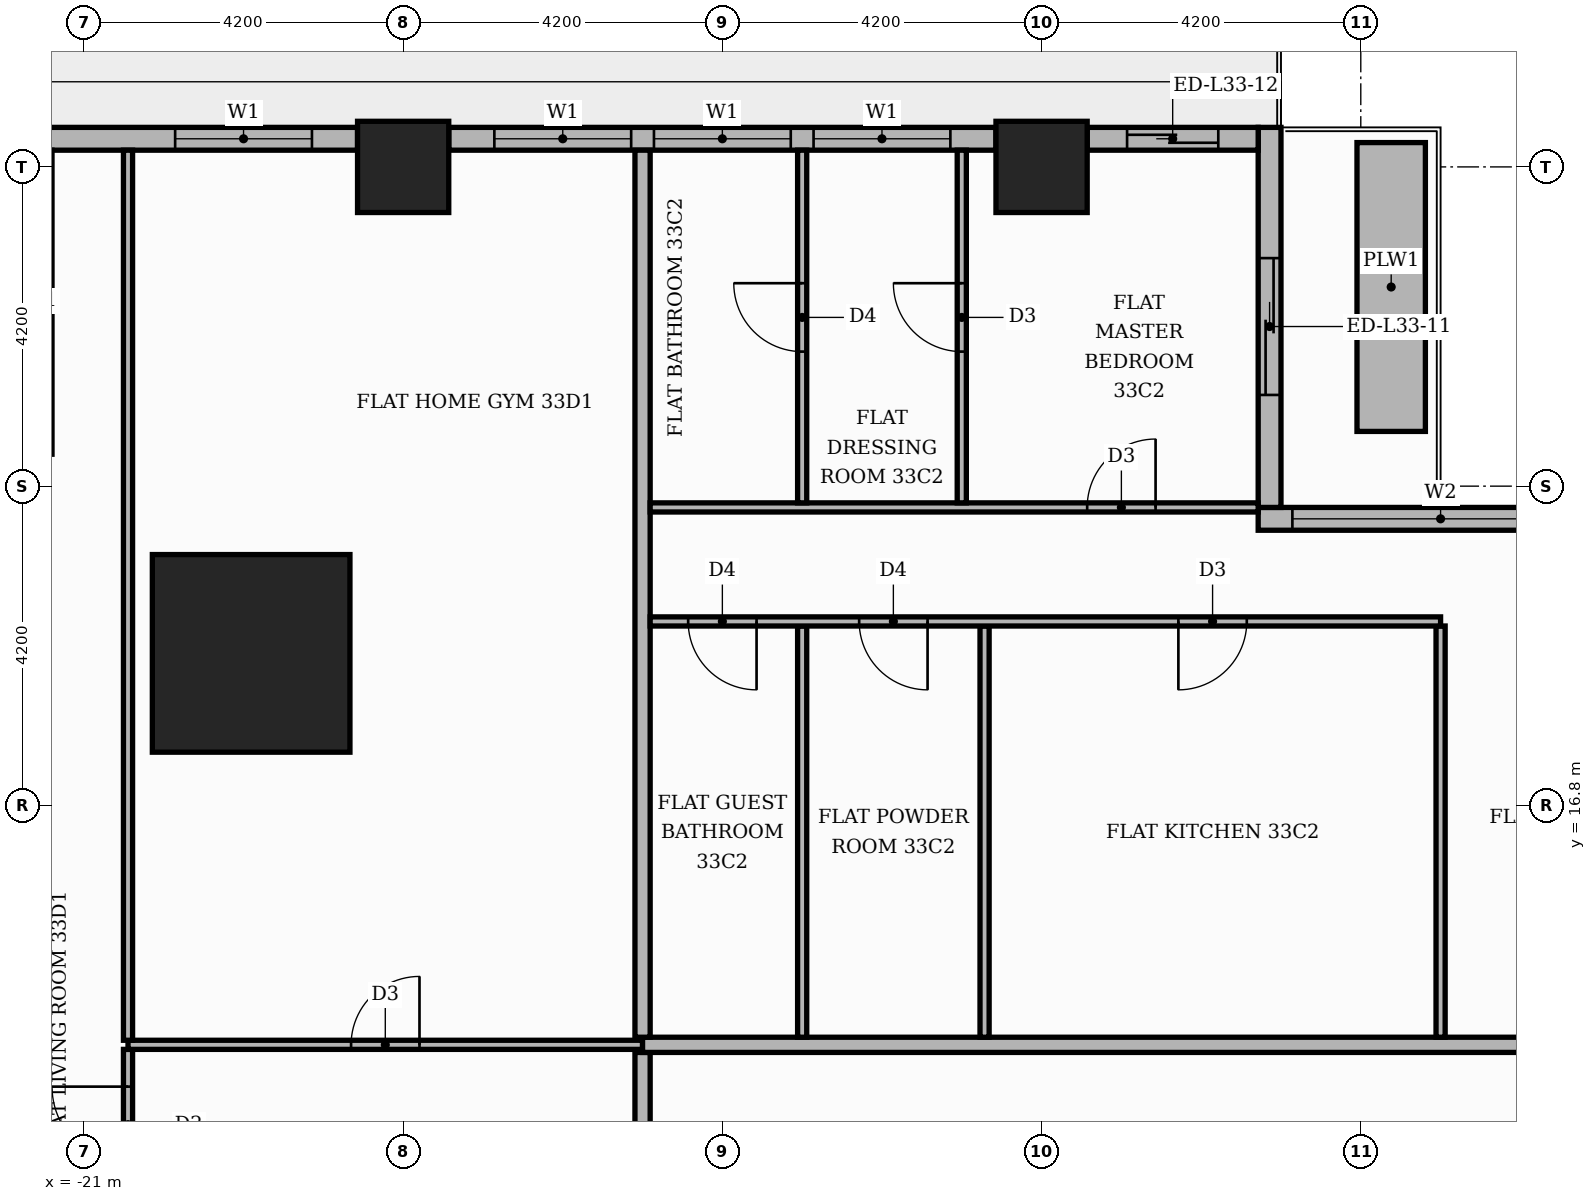
"""IFC4 building model, lengths in metres.
Left out: names, types, materials, properties, quantities, classifications, styles, units other than length and angle.
Written with IfcOpenShell. Run it as: python <this file> out.ifc"""

import sys

from ifc_helpers import new_model, si_unit, direction, frame, frame_2d, origin, origin_2d, place, context, subcontext, project, spatial, rectangle, extrude, element, fill, save


model = new_model("IFC4")
c1 = context("Model", 3, precision=1e-05, world=origin(), true_north=direction((0.0, 1.0)))
c2 = subcontext(c1, "Body", "Model", "MODEL_VIEW")
j1 = project(units=[si_unit("LENGTHUNIT", "METRE"), si_unit("PLANEANGLEUNIT", "RADIAN")], contexts=[c1])
p1 = place(None, origin())
s1 = spatial("IfcSite", under=j1, at=p1, CompositionType="ELEMENT")
p2 = place(p1, origin())
s2 = spatial("IfcBuilding", under=s1, at=p2, CompositionType="ELEMENT")
p3 = place(p2, frame((0.0, 0.0, 141.6)))
s3 = spatial("IfcBuildingStorey", under=s2, at=p3, CompositionType="ELEMENT", Elevation=141.6)
p4 = place(p3, frame((-18.8, 18.8, 0.0), z_axis=(0.0, 0.0, 1.0), x_axis=(1.0, 0.0, 0.0)))
e1 = element("IfcColumn", 1, at=p4, inside=s3, PredefinedType="COLUMN", context=c2, shape_type="SweptSolid", body=[
    extrude(rectangle(XDim=2.6, YDim=2.6, at=origin_2d()), origin(), (0.0, 0.0, 1.0), 3.9),
])
for number, where, z_axis, x_axis in (
    (2, (-8.4, 25.2, 0.0), (0.0, 0.0, 1.0), (1.0, 0.0, 0.0)),
    (3, (-16.8, 25.2, 0.0), (0.0, 0.0, 1.0), (1.0, 0.0, 0.0)),
):
    element("IfcColumn", number, at=place(p3, frame(where, z_axis=z_axis, x_axis=x_axis)), inside=s3, PredefinedType="COLUMN", context=c2, shape_type="SweptSolid", body=[
        extrude(rectangle(XDim=1.2, YDim=1.2, at=origin_2d()), origin(), (0.0, 0.0, 1.0), 3.9),
    ])
p5 = place(p3, frame((5.25, 20.57, 0.0), z_axis=(0.0, 0.0, 1.0), x_axis=(-1.0, 0.0, 0.0)))
e4 = element("IfcWall", 4, at=p5, inside=s3, PredefinedType="STANDARD", context=c2, shape_type="SweptSolid", body=[
    extrude(rectangle(XDim=10.8, YDim=0.3, at=frame_2d((5.4, 0.0))), origin(), (0.0, 0.0, 1.0), 3.48),
])
p6 = place(p5, frame((0.15, 0.0, 0.9)))
e5 = element("IfcOpeningElement", 5, at=p6, cuts=e4, PredefinedType="OPENING", context=c2, shape_type="SweptSolid", body=[
    extrude(rectangle(XDim=6.0, YDim=2.1, at=frame_2d((3.0, 1.05))), frame((0.0, 0.16, 0.0), z_axis=(0.0, -1.0, 0.0), x_axis=(1.0, 0.0, 0.0)), (0.0, 0.0, 1.0), 0.32),
])
p7 = place(p5, frame((6.45, 0.0, 0.9)))
e6 = element("IfcOpeningElement", 6, at=p7, cuts=e4, PredefinedType="OPENING", context=c2, shape_type="SweptSolid", body=[
    extrude(rectangle(XDim=3.9, YDim=2.1, at=frame_2d((1.95, 1.05))), frame((0.0, 0.16, 0.0), z_axis=(0.0, -1.0, 0.0), x_axis=(1.0, 0.0, 0.0)), (0.0, 0.0, 1.0), 0.32),
])
p8 = place(p3, frame((-5.4, 20.72, 0.0), z_axis=(0.0, 0.0, 1.0), x_axis=(0.0, 1.0, 0.0)))
e7 = element("IfcWall", 7, at=p8, inside=s3, PredefinedType="STANDARD", context=c2, shape_type="SweptSolid", body=[
    extrude(rectangle(XDim=5.0, YDim=0.3, at=frame_2d((2.5, 0.0))), origin(), (0.0, 0.0, 1.0), 3.48),
])
p9 = place(p8, frame((1.48, 0.0, 0.0)))
e8 = element("IfcOpeningElement", 8, at=p9, cuts=e7, PredefinedType="OPENING", context=c2, shape_type="SweptSolid", body=[
    extrude(rectangle(XDim=1.8, YDim=2.4, at=frame_2d((0.9, 1.2))), frame((0.0, 0.16, 0.0), z_axis=(0.0, -1.0, 0.0), x_axis=(1.0, 0.0, 0.0)), (0.0, 0.0, 1.0), 0.32),
])
p10 = place(p3, frame((-5.55, 25.57, 0.0), z_axis=(0.0, 0.0, 1.0), x_axis=(-1.0, 0.0, 0.0)))
e9 = element("IfcWall", 9, at=p10, inside=s3, PredefinedType="STANDARD", context=c2, shape_type="SweptSolid", body=[
    extrude(rectangle(XDim=2.25, YDim=0.3, at=frame_2d((1.125, 0.0))), origin(), (0.0, 0.0, 1.0), 3.48),
])
p11 = place(p10, frame((0.525, 0.0, 0.0)))
e10 = element("IfcOpeningElement", 10, at=p11, cuts=e9, PredefinedType="OPENING", context=c2, shape_type="SweptSolid", body=[
    extrude(rectangle(XDim=1.2, YDim=2.4, at=frame_2d((0.6, 1.2))), frame((0.0, 0.16, 0.0), z_axis=(0.0, -1.0, 0.0), x_axis=(1.0, 0.0, 0.0)), (0.0, 0.0, 1.0), 0.32),
])
p12 = place(p3, frame((-9.0, 25.57, 0.0), z_axis=(0.0, 0.0, 1.0), x_axis=(-1.0, 0.0, 0.0)))
e11 = element("IfcWall", 11, at=p12, inside=s3, PredefinedType="STANDARD", context=c2, shape_type="SweptSolid", body=[
    extrude(rectangle(XDim=7.2, YDim=0.3, at=frame_2d((3.6, 0.0))), origin(), (0.0, 0.0, 1.0), 3.48),
])
p13 = place(p12, frame((0.6, 0.0, 0.9)))
e12 = element("IfcOpeningElement", 12, at=p13, cuts=e11, PredefinedType="OPENING", context=c2, shape_type="SweptSolid", body=[
    extrude(rectangle(XDim=1.8, YDim=2.1, at=frame_2d((0.9, 1.05))), frame((0.0, 0.16, 0.0), z_axis=(0.0, -1.0, 0.0), x_axis=(1.0, 0.0, 0.0)), (0.0, 0.0, 1.0), 0.32),
])
p14 = place(p12, frame((2.7, 0.0, 0.9)))
e13 = element("IfcOpeningElement", 13, at=p14, cuts=e11, PredefinedType="OPENING", context=c2, shape_type="SweptSolid", body=[
    extrude(rectangle(XDim=1.8, YDim=2.1, at=frame_2d((0.9, 1.05))), frame((0.0, 0.16, 0.0), z_axis=(0.0, -1.0, 0.0), x_axis=(1.0, 0.0, 0.0)), (0.0, 0.0, 1.0), 0.32),
])
p15 = place(p12, frame((4.8, 0.0, 0.9)))
e14 = element("IfcOpeningElement", 14, at=p15, cuts=e11, PredefinedType="OPENING", context=c2, shape_type="SweptSolid", body=[
    extrude(rectangle(XDim=1.8, YDim=2.1, at=frame_2d((0.9, 1.05))), frame((0.0, 0.16, 0.0), z_axis=(0.0, -1.0, 0.0), x_axis=(1.0, 0.0, 0.0)), (0.0, 0.0, 1.0), 0.32),
])
p16 = place(p3, frame((-17.4, 25.57, 0.0), z_axis=(0.0, 0.0, 1.0), x_axis=(-1.0, 0.0, 0.0)))
e15 = element("IfcWall", 15, at=p16, inside=s3, PredefinedType="STANDARD", context=c2, shape_type="SweptSolid", body=[
    extrude(rectangle(XDim=4.32, YDim=0.3, at=frame_2d((2.16, 0.0))), origin(), (0.0, 0.0, 1.0), 3.48),
])
p17 = place(p16, frame((0.6, 0.0, 0.9)))
e16 = element("IfcOpeningElement", 16, at=p17, cuts=e15, PredefinedType="OPENING", context=c2, shape_type="SweptSolid", body=[
    extrude(rectangle(XDim=1.8, YDim=2.1, at=frame_2d((0.9, 1.05))), frame((0.0, 0.16, 0.0), z_axis=(0.0, -1.0, 0.0), x_axis=(1.0, 0.0, 0.0)), (0.0, 0.0, 1.0), 0.32),
])
p18 = place(p3, frame((-3.8, 21.72, 0.0), z_axis=(0.0, 0.0, 1.0), x_axis=(0.0, 1.0, 0.0)))
e17 = element("IfcWall", 17, at=p18, inside=s3, PredefinedType="MOVABLE", context=c2, shape_type="SweptSolid", body=[
    extrude(rectangle(XDim=3.8, YDim=0.9, at=frame_2d((1.9, 0.0))), origin(), (0.0, 0.0, 1.0), 0.6),
])
p19 = place(p3, frame((-13.65, 11.1, 0.0), z_axis=(0.0, 0.0, 1.0), x_axis=(0.0, 1.0, 0.0)))
e18 = element("IfcWall", 18, at=p19, inside=s3, PredefinedType="PARTITIONING", context=c2, shape_type="SweptSolid", body=[
    extrude(rectangle(XDim=2.45, YDim=0.2, at=frame_2d((1.225, 0.0))), origin(), (0.0, 0.0, 1.0), 3.48),
])
p20 = place(p3, frame((-20.42, 11.61, 0.0), z_axis=(0.0, 0.0, 1.0), x_axis=(0.0, 1.0, 0.0)))
e19 = element("IfcWall", 19, at=p20, inside=s3, PredefinedType="PARTITIONING", context=c2, shape_type="SweptSolid", body=[
    extrude(rectangle(XDim=1.98, YDim=0.12, at=frame_2d((0.99, 0.0))), origin(), (0.0, 0.0, 1.0), 3.48),
])
p21 = place(p20, frame((0.49, 0.0, 0.0)))
e20 = element("IfcOpeningElement", 20, at=p21, cuts=e19, PredefinedType="OPENING", context=c2, shape_type="SweptSolid", body=[
    extrude(rectangle(XDim=1.0, YDim=2.1, at=frame_2d((0.5, 1.05))), frame((0.0, 0.07, 0.0), z_axis=(0.0, -1.0, 0.0), x_axis=(1.0, 0.0, 0.0)), (0.0, 0.0, 1.0), 0.14),
])
p22 = place(p3, frame((-20.42, 13.65, 0.0), z_axis=(0.0, 0.0, 1.0), x_axis=(1.0, 0.0, 0.0)))
e21 = element("IfcWall", 21, at=p22, inside=s3, PredefinedType="PARTITIONING", context=c2, shape_type="SweptSolid", body=[
    extrude(rectangle(XDim=6.77, YDim=0.12, at=frame_2d((3.385, 0.0))), origin(), (0.0, 0.0, 1.0), 3.48),
])
p23 = place(p22, frame((2.935, 0.0, 0.0)))
e22 = element("IfcOpeningElement", 22, at=p23, cuts=e21, PredefinedType="OPENING", context=c2, shape_type="SweptSolid", body=[
    extrude(rectangle(XDim=0.9, YDim=2.1, at=frame_2d((0.45, 1.05))), frame((0.0, 0.07, 0.0), z_axis=(0.0, -1.0, 0.0), x_axis=(1.0, 0.0, 0.0)), (0.0, 0.0, 1.0), 0.14),
])
p24 = place(p3, frame((-13.65, 13.65, 0.0), z_axis=(0.0, 0.0, 1.0), x_axis=(1.0, 0.0, 0.0)))
e23 = element("IfcWall", 23, at=p24, inside=s3, PredefinedType="PARTITIONING", context=c2, shape_type="SweptSolid", body=[
    extrude(rectangle(XDim=39.07, YDim=0.2, at=frame_2d((19.535, 0.0))), origin(), (0.0, 0.0, 1.0), 3.48),
])
p25 = place(p24, frame((24.65, 0.0, 0.0)))
e24 = element("IfcOpeningElement", 24, at=p25, cuts=e23, PredefinedType="OPENING", context=c2, shape_type="SweptSolid", body=[
    extrude(rectangle(XDim=1.1, YDim=2.4, at=frame_2d((0.55, 1.2))), frame((0.0, 0.11, 0.0), z_axis=(0.0, -1.0, 0.0), x_axis=(1.0, 0.0, 0.0)), (0.0, 0.0, 1.0), 0.22),
])
p26 = place(p24, frame((12.05, 0.0, 0.0)))
e25 = element("IfcOpeningElement", 25, at=p26, cuts=e23, PredefinedType="OPENING", context=c2, shape_type="SweptSolid", body=[
    extrude(rectangle(XDim=1.1, YDim=2.4, at=frame_2d((0.55, 1.2))), frame((0.0, 0.11, 0.0), z_axis=(0.0, -1.0, 0.0), x_axis=(1.0, 0.0, 0.0)), (0.0, 0.0, 1.0), 0.22),
])
p27 = place(p3, frame((-20.42, 13.71, 0.0), z_axis=(0.0, 0.0, 1.0), x_axis=(0.0, 1.0, 0.0)))
e26 = element("IfcWall", 26, at=p27, inside=s3, PredefinedType="PARTITIONING", context=c2, shape_type="SweptSolid", body=[
    extrude(rectangle(XDim=11.71, YDim=0.12, at=frame_2d((5.855, 0.0))), origin(), (0.0, 0.0, 1.0), 3.48),
])
p28 = place(p3, frame((-13.65, 13.75, 0.0), z_axis=(0.0, 0.0, 1.0), x_axis=(0.0, 1.0, 0.0)))
e27 = element("IfcWall", 27, at=p28, inside=s3, PredefinedType="PARTITIONING", context=c2, shape_type="SweptSolid", body=[
    extrude(rectangle(XDim=11.67, YDim=0.2, at=frame_2d((5.835, 0.0))), origin(), (0.0, 0.0, 1.0), 3.48),
])
for number, where, z_axis, x_axis in (
    (28, (-11.55, 13.75, 0.0), (0.0, 0.0, 1.0), (0.0, 1.0, 0.0)),
    (29, (-9.15, 13.75, 0.0), (0.0, 0.0, 1.0), (0.0, 1.0, 0.0)),
    (30, (-3.15, 13.75, 0.0), (0.0, 0.0, 1.0), (0.0, 1.0, 0.0)),
):
    element("IfcWall", number, at=place(p3, frame(where, z_axis=z_axis, x_axis=x_axis)), inside=s3, PredefinedType="PARTITIONING", context=c2, shape_type="SweptSolid", body=[
        extrude(rectangle(XDim=5.41, YDim=0.12, at=frame_2d((2.705, 0.0))), origin(), (0.0, 0.0, 1.0), 3.48),
    ])
p29 = place(p3, frame((-13.55, 19.22, 0.0), z_axis=(0.0, 0.0, 1.0), x_axis=(1.0, 0.0, 0.0)))
e31 = element("IfcWall", 31, at=p29, inside=s3, PredefinedType="PARTITIONING", context=c2, shape_type="SweptSolid", body=[
    extrude(rectangle(XDim=10.4, YDim=0.12, at=frame_2d((5.2, 0.0))), origin(), (0.0, 0.0, 1.0), 3.48),
])
p30 = place(p29, frame((6.95, 0.0, 0.0)))
e32 = element("IfcOpeningElement", 32, at=p30, cuts=e31, PredefinedType="OPENING", context=c2, shape_type="SweptSolid", body=[
    extrude(rectangle(XDim=0.9, YDim=2.1, at=frame_2d((0.45, 1.05))), frame((0.0, 0.07, 0.0), z_axis=(0.0, -1.0, 0.0), x_axis=(1.0, 0.0, 0.0)), (0.0, 0.0, 1.0), 0.14),
])
p31 = place(p29, frame((2.75, 0.0, 0.0)))
e33 = element("IfcOpeningElement", 33, at=p31, cuts=e31, PredefinedType="OPENING", context=c2, shape_type="SweptSolid", body=[
    extrude(rectangle(XDim=0.9, YDim=2.1, at=frame_2d((0.45, 1.05))), frame((0.0, 0.07, 0.0), z_axis=(0.0, -1.0, 0.0), x_axis=(1.0, 0.0, 0.0)), (0.0, 0.0, 1.0), 0.14),
])
p32 = place(p29, frame((0.5, 0.0, 0.0)))
e34 = element("IfcOpeningElement", 34, at=p32, cuts=e31, PredefinedType="OPENING", context=c2, shape_type="SweptSolid", body=[
    extrude(rectangle(XDim=0.9, YDim=2.1, at=frame_2d((0.45, 1.05))), frame((0.0, 0.07, 0.0), z_axis=(0.0, -1.0, 0.0), x_axis=(1.0, 0.0, 0.0)), (0.0, 0.0, 1.0), 0.14),
])
p33 = place(p3, frame((-13.55, 20.72, 0.0), z_axis=(0.0, 0.0, 1.0), x_axis=(1.0, 0.0, 0.0)))
e35 = element("IfcWall", 35, at=p33, inside=s3, PredefinedType="PARTITIONING", context=c2, shape_type="SweptSolid", body=[
    extrude(rectangle(XDim=8.0, YDim=0.12, at=frame_2d((4.0, 0.0))), origin(), (0.0, 0.0, 1.0), 3.48),
])
p34 = place(p33, frame((5.75, 0.0, 0.0)))
e36 = element("IfcOpeningElement", 36, at=p34, cuts=e35, PredefinedType="OPENING", context=c2, shape_type="SweptSolid", body=[
    extrude(rectangle(XDim=0.9, YDim=2.1, at=frame_2d((0.45, 1.05))), frame((0.0, 0.07, 0.0), z_axis=(0.0, -1.0, 0.0), x_axis=(1.0, 0.0, 0.0)), (0.0, 0.0, 1.0), 0.14),
])
p35 = place(p3, frame((-11.55, 20.78, 0.0), z_axis=(0.0, 0.0, 1.0), x_axis=(0.0, 1.0, 0.0)))
e37 = element("IfcWall", 37, at=p35, inside=s3, PredefinedType="PARTITIONING", context=c2, shape_type="SweptSolid", body=[
    extrude(rectangle(XDim=4.64, YDim=0.12, at=frame_2d((2.32, 0.0))), origin(), (0.0, 0.0, 1.0), 3.48),
])
p36 = place(p35, frame((1.99, 0.0, 0.0)))
e38 = element("IfcOpeningElement", 38, at=p36, cuts=e37, PredefinedType="OPENING", context=c2, shape_type="SweptSolid", body=[
    extrude(rectangle(XDim=0.9, YDim=2.1, at=frame_2d((0.45, 1.05))), frame((0.0, 0.07, 0.0), z_axis=(0.0, -1.0, 0.0), x_axis=(1.0, 0.0, 0.0)), (0.0, 0.0, 1.0), 0.14),
])
p37 = place(p3, frame((-9.45, 20.78, 0.0), z_axis=(0.0, 0.0, 1.0), x_axis=(0.0, 1.0, 0.0)))
e39 = element("IfcWall", 39, at=p37, inside=s3, PredefinedType="PARTITIONING", context=c2, shape_type="SweptSolid", body=[
    extrude(rectangle(XDim=4.64, YDim=0.12, at=frame_2d((2.32, 0.0))), origin(), (0.0, 0.0, 1.0), 3.48),
])
p38 = place(p37, frame((1.99, 0.0, 0.0)))
e40 = element("IfcOpeningElement", 40, at=p38, cuts=e39, PredefinedType="OPENING", context=c2, shape_type="SweptSolid", body=[
    extrude(rectangle(XDim=0.9, YDim=2.1, at=frame_2d((0.45, 1.05))), frame((0.0, 0.07, 0.0), z_axis=(0.0, -1.0, 0.0), x_axis=(1.0, 0.0, 0.0)), (0.0, 0.0, 1.0), 0.14),
])
p39 = place(p7, origin())
e41 = element("IfcWindow", 41, at=p39, inside=s3, PartitioningType="SINGLE_PANEL", PredefinedType="WINDOW", context=c2, shape_type="SweptSolid", body=[
    extrude(rectangle(XDim=3.9, YDim=2.1, at=frame_2d((1.95, 1.05))), frame((0.0, 0.03, 0.0), z_axis=(0.0, -1.0, 0.0), x_axis=(1.0, 0.0, 0.0)), (0.0, 0.0, 1.0), 0.06),
])
fill(e6, e41)
p40 = place(p9, origin())
e42 = element("IfcDoor", 42, at=p40, inside=s3, OperationType="SLIDING_TO_RIGHT", PredefinedType="DOOR", context=c2, shape_type="SweptSolid", body=[
    extrude(rectangle(XDim=1.8, YDim=2.4, at=frame_2d((0.9, 1.2))), frame((0.0, 0.025, 0.0), z_axis=(0.0, -1.0, 0.0), x_axis=(1.0, 0.0, 0.0)), (0.0, 0.0, 1.0), 0.05),
])
fill(e8, e42)
p41 = place(p11, origin())
e43 = element("IfcDoor", 43, at=p41, inside=s3, OperationType="SLIDING_TO_RIGHT", PredefinedType="DOOR", context=c2, shape_type="SweptSolid", body=[
    extrude(rectangle(XDim=1.2, YDim=2.4, at=frame_2d((0.6, 1.2))), frame((0.0, 0.025, 0.0), z_axis=(0.0, -1.0, 0.0), x_axis=(1.0, 0.0, 0.0)), (0.0, 0.0, 1.0), 0.05),
])
fill(e10, e43)
p42 = place(p13, origin())
e44 = element("IfcWindow", 44, at=p42, inside=s3, PartitioningType="SINGLE_PANEL", PredefinedType="WINDOW", context=c2, shape_type="SweptSolid", body=[
    extrude(rectangle(XDim=1.8, YDim=2.1, at=frame_2d((0.9, 1.05))), frame((0.0, 0.03, 0.0), z_axis=(0.0, -1.0, 0.0), x_axis=(1.0, 0.0, 0.0)), (0.0, 0.0, 1.0), 0.06),
])
fill(e12, e44)
p43 = place(p14, origin())
e45 = element("IfcWindow", 45, at=p43, inside=s3, PartitioningType="SINGLE_PANEL", PredefinedType="WINDOW", context=c2, shape_type="SweptSolid", body=[
    extrude(rectangle(XDim=1.8, YDim=2.1, at=frame_2d((0.9, 1.05))), frame((0.0, 0.03, 0.0), z_axis=(0.0, -1.0, 0.0), x_axis=(1.0, 0.0, 0.0)), (0.0, 0.0, 1.0), 0.06),
])
fill(e13, e45)
p44 = place(p15, origin())
e46 = element("IfcWindow", 46, at=p44, inside=s3, PartitioningType="SINGLE_PANEL", PredefinedType="WINDOW", context=c2, shape_type="SweptSolid", body=[
    extrude(rectangle(XDim=1.8, YDim=2.1, at=frame_2d((0.9, 1.05))), frame((0.0, 0.03, 0.0), z_axis=(0.0, -1.0, 0.0), x_axis=(1.0, 0.0, 0.0)), (0.0, 0.0, 1.0), 0.06),
])
fill(e14, e46)
p45 = place(p17, origin())
e47 = element("IfcWindow", 47, at=p45, inside=s3, PartitioningType="SINGLE_PANEL", PredefinedType="WINDOW", context=c2, shape_type="SweptSolid", body=[
    extrude(rectangle(XDim=1.8, YDim=2.1, at=frame_2d((0.9, 1.05))), frame((0.0, 0.03, 0.0), z_axis=(0.0, -1.0, 0.0), x_axis=(1.0, 0.0, 0.0)), (0.0, 0.0, 1.0), 0.06),
])
fill(e16, e47)
p46 = place(p30, frame((0.9, 0.0, 0.0), z_axis=(0.0, 0.0, 1.0), x_axis=(-1.0, 0.0, 0.0)))
e48 = element("IfcDoor", 48, at=p46, inside=s3, OperationType="SINGLE_SWING_LEFT", PredefinedType="DOOR", context=c2, shape_type="SweptSolid", body=[
    extrude(rectangle(XDim=0.9, YDim=2.1, at=frame_2d((0.45, 1.05))), frame((0.0, 0.025, 0.0), z_axis=(0.0, -1.0, 0.0), x_axis=(1.0, 0.0, 0.0)), (0.0, 0.0, 1.0), 0.05),
])
fill(e32, e48)
p47 = place(p31, frame((0.9, 0.0, 0.0), z_axis=(0.0, 0.0, 1.0), x_axis=(-1.0, 0.0, 0.0)))
e49 = element("IfcDoor", 49, at=p47, inside=s3, OperationType="SINGLE_SWING_RIGHT", PredefinedType="DOOR", context=c2, shape_type="SweptSolid", body=[
    extrude(rectangle(XDim=0.9, YDim=2.1, at=frame_2d((0.45, 1.05))), frame((0.0, 0.025, 0.0), z_axis=(0.0, -1.0, 0.0), x_axis=(1.0, 0.0, 0.0)), (0.0, 0.0, 1.0), 0.05),
])
fill(e33, e49)
p48 = place(p32, frame((0.9, 0.0, 0.0), z_axis=(0.0, 0.0, 1.0), x_axis=(-1.0, 0.0, 0.0)))
e50 = element("IfcDoor", 50, at=p48, inside=s3, OperationType="SINGLE_SWING_RIGHT", PredefinedType="DOOR", context=c2, shape_type="SweptSolid", body=[
    extrude(rectangle(XDim=0.9, YDim=2.1, at=frame_2d((0.45, 1.05))), frame((0.0, 0.025, 0.0), z_axis=(0.0, -1.0, 0.0), x_axis=(1.0, 0.0, 0.0)), (0.0, 0.0, 1.0), 0.05),
])
fill(e34, e50)
p49 = place(p34, origin())
e51 = element("IfcDoor", 51, at=p49, inside=s3, OperationType="SINGLE_SWING_RIGHT", PredefinedType="DOOR", context=c2, shape_type="SweptSolid", body=[
    extrude(rectangle(XDim=0.9, YDim=2.1, at=frame_2d((0.45, 1.05))), frame((0.0, 0.025, 0.0), z_axis=(0.0, -1.0, 0.0), x_axis=(1.0, 0.0, 0.0)), (0.0, 0.0, 1.0), 0.05),
])
fill(e36, e51)
p50 = place(p38, origin())
e52 = element("IfcDoor", 52, at=p50, inside=s3, OperationType="SINGLE_SWING_RIGHT", PredefinedType="DOOR", context=c2, shape_type="SweptSolid", body=[
    extrude(rectangle(XDim=0.9, YDim=2.1, at=frame_2d((0.45, 1.05))), frame((0.0, 0.025, 0.0), z_axis=(0.0, -1.0, 0.0), x_axis=(1.0, 0.0, 0.0)), (0.0, 0.0, 1.0), 0.05),
])
fill(e40, e52)
p51 = place(p36, origin())
e53 = element("IfcDoor", 53, at=p51, inside=s3, OperationType="SINGLE_SWING_RIGHT", PredefinedType="DOOR", context=c2, shape_type="SweptSolid", body=[
    extrude(rectangle(XDim=0.9, YDim=2.1, at=frame_2d((0.45, 1.05))), frame((0.0, 0.025, 0.0), z_axis=(0.0, -1.0, 0.0), x_axis=(1.0, 0.0, 0.0)), (0.0, 0.0, 1.0), 0.05),
])
fill(e38, e53)
p52 = place(p23, origin())
e54 = element("IfcDoor", 54, at=p52, inside=s3, OperationType="SINGLE_SWING_RIGHT", PredefinedType="DOOR", context=c2, shape_type="SweptSolid", body=[
    extrude(rectangle(XDim=0.9, YDim=2.1, at=frame_2d((0.45, 1.05))), frame((0.0, 0.025, 0.0), z_axis=(0.0, -1.0, 0.0), x_axis=(1.0, 0.0, 0.0)), (0.0, 0.0, 1.0), 0.05),
])
fill(e22, e54)
p53 = place(p21, origin())
e55 = element("IfcDoor", 55, at=p53, inside=s3, OperationType="SINGLE_SWING_RIGHT", PredefinedType="DOOR", context=c2, shape_type="SweptSolid", body=[
    extrude(rectangle(XDim=1.0, YDim=2.1, at=frame_2d((0.5, 1.05))), frame((0.0, 0.025, 0.0), z_axis=(0.0, -1.0, 0.0), x_axis=(1.0, 0.0, 0.0)), (0.0, 0.0, 1.0), 0.05),
])
fill(e20, e55)
save(model, sys.argv[1])
